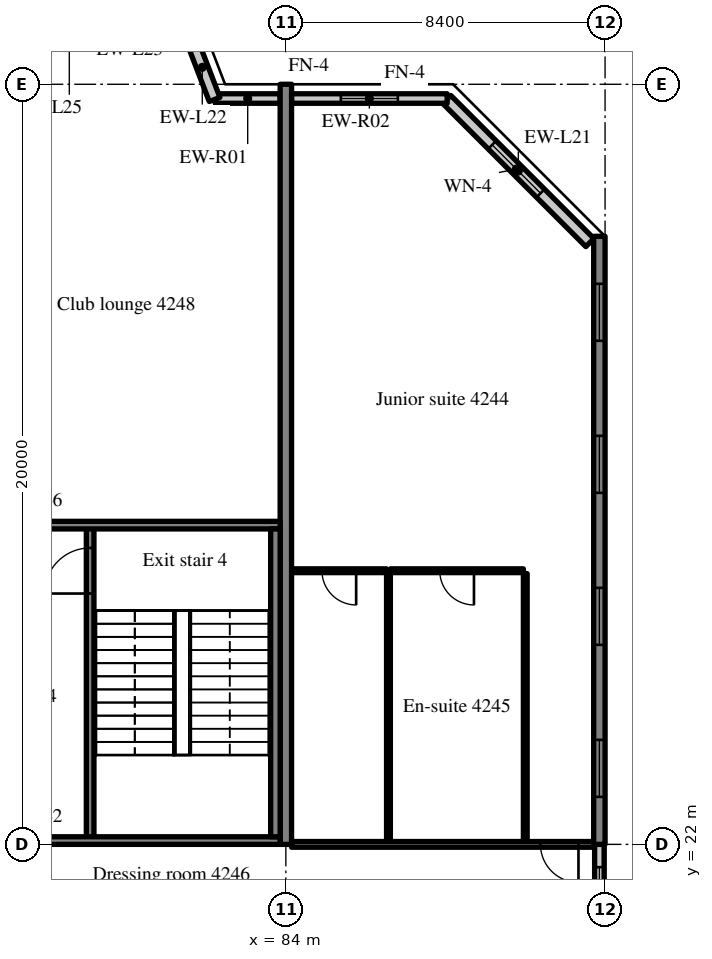
"""IFC4 building model, lengths in metres.
Left out: names, types, materials, properties, quantities, classifications, styles, units other than length and angle.
Written with IfcOpenShell. Run it as: python <this file> out.ifc"""

import sys

from ifc_helpers import new_model, si_unit, direction, frame, frame_2d, origin, place, context, subcontext, project, spatial, rectangle, extrude, source, transform, mapped, element, fill, save


model = new_model("IFC4")
c1 = context("Model", 3, precision=1e-05, world=origin(), true_north=direction((0.0, 1.0)))
c2 = subcontext(c1, "Body", "Model", "MODEL_VIEW")
j1 = project(units=[si_unit("LENGTHUNIT", "METRE"), si_unit("PLANEANGLEUNIT", "RADIAN")], contexts=[c1])
p1 = place(None, origin())
s1 = spatial("IfcSite", under=j1, at=p1, CompositionType="ELEMENT")
p2 = place(p1, origin())
s2 = spatial("IfcBuilding", under=s1, at=p2, CompositionType="ELEMENT")
p3 = place(p2, frame((0.0, 0.0, 174.4)))
s3 = spatial("IfcBuildingStorey", under=s2, at=p3, CompositionType="ELEMENT", Elevation=174.4)
m1 = source(origin(), c2, "Body", "SweptSolid", [
    extrude(rectangle(XDim=20.0, YDim=0.3, at=frame_2d((10.0, 0.0))), origin(), (0.0, 0.0, 1.0), 3.52),
])
p4 = place(p3, frame((84.0, 22.0, 0.0), z_axis=(0.0, 0.0, 1.0), x_axis=(0.0, 1.0, 0.0)))
e1 = element("IfcWall", 1, at=p4, inside=s3, PredefinedType="SHEAR", context=c2, shape_type="MappedRepresentation", body=[
    mapped(m1, transform((0.0, 0.0, 0.0), scale=1.0)),
])
m2 = source(origin(), c2, "Body", "SweptSolid", [
    extrude(rectangle(XDim=16.0, YDim=0.3, at=frame_2d((8.0, 0.0))), origin(), (0.0, 0.0, 1.0), 3.52),
])
p5 = place(p3, frame((92.25, 22.0, 0.0), z_axis=(0.0, 0.0, 1.0), x_axis=(0.0, 1.0, 0.0)))
e2 = element("IfcWall", 2, at=p5, inside=s3, PredefinedType="SHEAR", context=c2, shape_type="MappedRepresentation", body=[
    mapped(m2, transform((0.0, 0.0, 0.0), scale=1.0)),
])
m3 = source(origin(), c2, "Body", "SweptSolid", [
    extrude(rectangle(XDim=1.5, YDim=1.5, at=frame_2d((0.75, 0.75))), frame((0.0, 0.16, 0.0), z_axis=(0.0, -1.0, 0.0), x_axis=(1.0, 0.0, 0.0)), (0.0, 0.0, 1.0), 0.32),
])
p6 = place(p5, frame((1.25, 0.0, 0.9)))
e3 = element("IfcOpeningElement", 3, at=p6, cuts=e2, PredefinedType="OPENING", context=c2, shape_type="MappedRepresentation", body=[
    mapped(m3, transform((0.0, 0.0, 0.0), scale=1.0)),
])
p7 = place(p5, frame((5.25, 0.0, 0.9)))
e4 = element("IfcOpeningElement", 4, at=p7, cuts=e2, PredefinedType="OPENING", context=c2, shape_type="MappedRepresentation", body=[
    mapped(m3, transform((0.0, 0.0, 0.0), scale=1.0)),
])
p8 = place(p5, frame((9.25, 0.0, 0.9)))
e5 = element("IfcOpeningElement", 5, at=p8, cuts=e2, PredefinedType="OPENING", context=c2, shape_type="MappedRepresentation", body=[
    mapped(m3, transform((0.0, 0.0, 0.0), scale=1.0)),
])
p9 = place(p5, frame((13.25, 0.0, 0.9)))
e6 = element("IfcOpeningElement", 6, at=p9, cuts=e2, PredefinedType="OPENING", context=c2, shape_type="MappedRepresentation", body=[
    mapped(m3, transform((0.0, 0.0, 0.0), scale=1.0)),
])
m4 = source(origin(), c2, "Body", "SweptSolid", [
    extrude(rectangle(XDim=5.326, YDim=0.3, at=frame_2d((2.663, 0.0))), origin(), (0.0, 0.0, 1.0), 3.52),
])
p10 = place(p3, frame((92.0, 37.834, 0.0), z_axis=(0.0, 0.0, 1.0), x_axis=(-0.707083859269, 0.707129702361, 0.0)))
e7 = element("IfcWall", 7, at=p10, inside=s3, PredefinedType="SOLIDWALL", context=c2, shape_type="MappedRepresentation", body=[
    mapped(m4, transform((0.0, 0.0, 0.0), scale=1.0)),
])
m5 = source(origin(), c2, "Body", "SweptSolid", [
    extrude(rectangle(XDim=1.8, YDim=1.5, at=frame_2d((0.9, 0.75))), frame((0.0, 0.16, 0.0), z_axis=(0.0, -1.0, 0.0), x_axis=(1.0, 0.0, 0.0)), (0.0, 0.0, 1.0), 0.32),
])
p11 = place(p10, frame((1.836, 0.0, 0.9)))
e8 = element("IfcOpeningElement", 8, at=p11, cuts=e7, PredefinedType="OPENING", context=c2, shape_type="MappedRepresentation", body=[
    mapped(m5, transform((0.0, 0.0, 0.0), scale=1.0)),
])
m6 = source(origin(), c2, "Body", "SweptSolid", [
    extrude(rectangle(XDim=1.708, YDim=0.25, at=frame_2d((0.854, 0.0))), origin(), (0.0, 0.0, 1.0), 2.87),
])
p12 = place(p3, frame((83.85, 41.625, 0.0), z_axis=(0.0, 0.0, 1.0), x_axis=(-1.0, 0.0, 0.0)))
e9 = element("IfcWall", 9, at=p12, inside=s3, PredefinedType="SOLIDWALL", context=c2, shape_type="MappedRepresentation", body=[
    mapped(m6, transform((0.0, 0.0, 0.0), scale=1.0)),
])
m7 = source(origin(), c2, "Body", "SweptSolid", [
    extrude(rectangle(XDim=4.095, YDim=0.25, at=frame_2d((2.047, 0.0))), origin(), (0.0, 0.0, 1.0), 2.87),
])
p13 = place(p3, frame((88.245, 41.625, 0.0), z_axis=(0.0, 0.0, 1.0), x_axis=(-1.0, 0.0, 0.0)))
e10 = element("IfcWall", 10, at=p13, inside=s3, PredefinedType="SOLIDWALL", context=c2, shape_type="MappedRepresentation", body=[
    mapped(m7, transform((0.0, 0.0, 0.0), scale=1.0)),
])
m8 = source(origin(), c2, "Body", "SweptSolid", [
    extrude(rectangle(XDim=1.5, YDim=1.5, at=frame_2d((0.75, 0.75))), frame((0.0, 0.135, 0.0), z_axis=(0.0, -1.0, 0.0), x_axis=(1.0, 0.0, 0.0)), (0.0, 0.0, 1.0), 0.27),
])
p14 = place(p13, frame((1.297, 0.0, 0.9)))
e11 = element("IfcOpeningElement", 11, at=p14, cuts=e10, PredefinedType="OPENING", context=c2, shape_type="MappedRepresentation", body=[
    mapped(m8, transform((0.0, 0.0, 0.0), scale=1.0)),
])
m9 = source(origin(), c2, "Body", "SweptSolid", [
    extrude(rectangle(XDim=1.812, YDim=0.3, at=frame_2d((0.906, 0.0))), origin(), (0.0, 0.0, 1.0), 3.52),
])
p15 = place(p3, frame((82.125, 41.6, 0.0), z_axis=(0.0, 0.0, 1.0), x_axis=(-0.357877270961, 0.93376863244, 0.0)))
e12 = element("IfcWall", 12, at=p15, inside=s3, PredefinedType="SOLIDWALL", context=c2, shape_type="MappedRepresentation", body=[
    mapped(m9, transform((0.0, 0.0, 0.0), scale=1.0)),
])
m10 = source(origin(), c2, "Body", "SweptSolid", [
    extrude(rectangle(XDim=2.4, YDim=0.25, at=frame_2d((1.2, 0.0))), origin(), (0.0, 0.0, 1.0), 2.62),
])
p16 = place(p3, frame((92.25, 19.6, 0.0), z_axis=(0.0, 0.0, 1.0), x_axis=(0.0, 1.0, 0.0)))
e13 = element("IfcWall", 13, at=p16, inside=s3, PredefinedType="SOLIDWALL", context=c2, shape_type="MappedRepresentation", body=[
    mapped(m10, transform((0.0, 0.0, 0.0), scale=1.0)),
])
m11 = source(origin(), c2, "Body", "SweptSolid", [
    extrude(rectangle(XDim=1.2, YDim=1.5, at=frame_2d((0.6, 0.75))), frame((0.0, 0.135, 0.0), z_axis=(0.0, -1.0, 0.0), x_axis=(1.0, 0.0, 0.0)), (0.0, 0.0, 1.0), 0.27),
])
p17 = place(p16, frame((0.6, 0.0, 0.9)))
e14 = element("IfcOpeningElement", 14, at=p17, cuts=e13, PredefinedType="OPENING", context=c2, shape_type="MappedRepresentation", body=[
    mapped(m11, transform((0.0, 0.0, 0.0), scale=1.0)),
])
m12 = source(origin(), c2, "Body", "SweptSolid", [
    extrude(rectangle(XDim=8.3, YDim=0.2, at=frame_2d((4.15, 0.0))), origin(), (0.0, 0.0, 1.0), 3.52),
])
p18 = place(p3, frame((78.85, 22.1, 0.0), z_axis=(0.0, 0.0, 1.0), x_axis=(0.0, 1.0, 0.0)))
e15 = element("IfcWall", 15, at=p18, inside=s3, PredefinedType="SOLIDWALL", context=c2, shape_type="MappedRepresentation", body=[
    mapped(m12, transform((0.0, 0.0, 0.0), scale=1.0)),
])
m13 = source(origin(), c2, "Body", "SweptSolid", [
    extrude(rectangle(XDim=1.2, YDim=2.1, at=frame_2d((0.6, 1.05))), frame((0.0, 0.11, 0.0), z_axis=(0.0, -1.0, 0.0), x_axis=(1.0, 0.0, 0.0)), (0.0, 0.0, 1.0), 0.22),
])
p19 = place(p18, frame((6.5, 0.0, 0.0)))
e16 = element("IfcOpeningElement", 16, at=p19, cuts=e15, PredefinedType="OPENING", context=c2, shape_type="MappedRepresentation", body=[
    mapped(m13, transform((0.0, 0.0, 0.0), scale=1.0)),
])
m14 = source(origin(), c2, "Body", "SweptSolid", [
    extrude(rectangle(XDim=8.25, YDim=0.2, at=frame_2d((4.125, 0.0))), origin(), (0.0, 0.0, 1.0), 3.52),
])
p20 = place(p3, frame((83.85, 22.1, 0.0), z_axis=(0.0, 0.0, 1.0), x_axis=(-1.0, 0.0, 0.0)))
e17 = element("IfcWall", 17, at=p20, inside=s3, PredefinedType="SOLIDWALL", context=c2, shape_type="MappedRepresentation", body=[
    mapped(m14, transform((0.0, 0.0, 0.0), scale=1.0)),
])
p21 = place(p20, frame((6.05, 0.0, 0.0)))
e18 = element("IfcOpeningElement", 18, at=p21, cuts=e17, PredefinedType="OPENING", context=c2, shape_type="MappedRepresentation", body=[
    mapped(m13, transform((0.0, 0.0, 0.0), scale=1.0)),
])
p22 = place(p3, frame((83.85, 30.4, 0.0), z_axis=(0.0, 0.0, 1.0), x_axis=(-1.0, 0.0, 0.0)))
e19 = element("IfcWall", 19, at=p22, inside=s3, PredefinedType="SOLIDWALL", context=c2, shape_type="MappedRepresentation", body=[
    mapped(m14, transform((0.0, 0.0, 0.0), scale=1.0)),
])
m15 = source(origin(), c2, "Body", "SweptSolid", [
    extrude(rectangle(XDim=1.0, YDim=2.1, at=frame_2d((0.5, 1.05))), frame((0.0, 0.11, 0.0), z_axis=(0.0, -1.0, 0.0), x_axis=(1.0, 0.0, 0.0)), (0.0, 0.0, 1.0), 0.22),
])
p23 = place(p22, frame((6.15, 0.0, 0.0)))
e20 = element("IfcOpeningElement", 20, at=p23, cuts=e19, PredefinedType="OPENING", context=c2, shape_type="MappedRepresentation", body=[
    mapped(m15, transform((0.0, 0.0, 0.0), scale=1.0)),
])
m16 = source(origin(), c2, "Body", "SweptSolid", [
    extrude(rectangle(XDim=8.1, YDim=0.25, at=frame_2d((4.05, 0.0))), origin(), (0.0, 0.0, 1.0), 3.52),
])
p24 = place(p3, frame((83.725, 22.2, 0.0), z_axis=(0.0, 0.0, 1.0), x_axis=(0.0, 1.0, 0.0)))
e21 = element("IfcWall", 21, at=p24, inside=s3, PredefinedType="SOLIDWALL", context=c2, shape_type="MappedRepresentation", body=[
    mapped(m16, transform((0.0, 0.0, 0.0), scale=1.0)),
])
m17 = source(origin(), c2, "Body", "SweptSolid", [
    extrude(rectangle(XDim=7.05, YDim=0.1, at=frame_2d((3.525, 0.0))), origin(), (0.0, 0.0, 1.0), 3.52),
])
for number, where, z_axis, x_axis in (
    (22, (90.3, 22.075, 0.0), (0.0, 0.0, 1.0), (0.0, 1.0, 0.0)),
    (23, (86.7, 22.075, 0.0), (0.0, 0.0, 1.0), (0.0, 1.0, 0.0)),
):
    element("IfcWall", number, at=place(p3, frame(where, z_axis=z_axis, x_axis=x_axis)), inside=s3, PredefinedType="PARTITIONING", context=c2, shape_type="MappedRepresentation", body=[
        mapped(m17, transform((0.0, 0.0, 0.0), scale=1.0)),
    ])
m18 = source(origin(), c2, "Body", "SweptSolid", [
    extrude(rectangle(XDim=3.5, YDim=0.1, at=frame_2d((1.75, 0.0))), origin(), (0.0, 0.0, 1.0), 3.52),
])
p25 = place(p3, frame((86.75, 29.2, 0.0), z_axis=(0.0, 0.0, 1.0), x_axis=(1.0, 0.0, 0.0)))
e24 = element("IfcWall", 24, at=p25, inside=s3, PredefinedType="PARTITIONING", context=c2, shape_type="MappedRepresentation", body=[
    mapped(m18, transform((0.0, 0.0, 0.0), scale=1.0)),
])
m19 = source(origin(), c2, "Body", "SweptSolid", [
    extrude(rectangle(XDim=0.9, YDim=2.1, at=frame_2d((0.45, 1.05))), frame((0.0, 0.06, 0.0), z_axis=(0.0, -1.0, 0.0), x_axis=(1.0, 0.0, 0.0)), (0.0, 0.0, 1.0), 0.12),
])
p26 = place(p25, frame((1.3, 0.0, 0.0)))
e25 = element("IfcOpeningElement", 25, at=p26, cuts=e24, PredefinedType="OPENING", context=c2, shape_type="MappedRepresentation", body=[
    mapped(m19, transform((0.0, 0.0, 0.0), scale=1.0)),
])
m20 = source(origin(), c2, "Body", "SweptSolid", [
    extrude(rectangle(XDim=2.5, YDim=0.1, at=frame_2d((1.25, 0.0))), origin(), (0.0, 0.0, 1.0), 3.52),
])
p27 = place(p3, frame((84.15, 29.2, 0.0), z_axis=(0.0, 0.0, 1.0), x_axis=(1.0, 0.0, 0.0)))
e26 = element("IfcWall", 26, at=p27, inside=s3, PredefinedType="PARTITIONING", context=c2, shape_type="MappedRepresentation", body=[
    mapped(m20, transform((0.0, 0.0, 0.0), scale=1.0)),
])
p28 = place(p27, frame((0.8, 0.0, 0.0)))
e27 = element("IfcOpeningElement", 27, at=p28, cuts=e26, PredefinedType="OPENING", context=c2, shape_type="MappedRepresentation", body=[
    mapped(m19, transform((0.0, 0.0, 0.0), scale=1.0)),
])
m21 = source(origin(), c2, "Body", "SweptSolid", [
    extrude(rectangle(XDim=7.95, YDim=0.15, at=frame_2d((3.975, 0.0))), origin(), (0.0, 0.0, 1.0), 2.82),
])
p29 = place(p3, frame((84.15, 22.0, 0.0), z_axis=(0.0, 0.0, 1.0), x_axis=(1.0, 0.0, 0.0)))
e28 = element("IfcWall", 28, at=p29, inside=s3, PredefinedType="PARTITIONING", context=c2, shape_type="MappedRepresentation", body=[
    mapped(m21, transform((0.0, 0.0, 0.0), scale=1.0)),
])
m22 = source(origin(), c2, "Body", "SweptSolid", [
    extrude(rectangle(XDim=1.0, YDim=2.1, at=frame_2d((0.5, 1.05))), frame((0.0, 0.085, 0.0), z_axis=(0.0, -1.0, 0.0), x_axis=(1.0, 0.0, 0.0)), (0.0, 0.0, 1.0), 0.17),
])
p30 = place(p29, frame((6.55, 0.0, 0.0)))
e29 = element("IfcOpeningElement", 29, at=p30, cuts=e28, PredefinedType="OPENING", context=c2, shape_type="MappedRepresentation", body=[
    mapped(m22, transform((0.0, 0.0, 0.0), scale=1.0)),
])
m23 = source(origin(), c2, "Body", "SweptSolid", [
    extrude(rectangle(XDim=1.8, YDim=1.5, at=frame_2d((0.9, 0.75))), frame((0.0, 0.03, 0.0), z_axis=(0.0, -1.0, 0.0), x_axis=(1.0, 0.0, 0.0)), (0.0, 0.0, 1.0), 0.06),
])
p31 = place(p11, origin())
e30 = element("IfcWindow", 30, at=p31, inside=s3, PartitioningType="SINGLE_PANEL", PredefinedType="WINDOW", context=c2, shape_type="MappedRepresentation", body=[
    mapped(m23, transform((0.0, 0.0, 0.0), scale=1.0)),
])
fill(e8, e30)
m24 = source(origin(), c2, "Body", "SweptSolid", [
    extrude(rectangle(XDim=1.5, YDim=1.5, at=frame_2d((0.75, 0.75))), frame((0.0, 0.03, 0.0), z_axis=(0.0, -1.0, 0.0), x_axis=(1.0, 0.0, 0.0)), (0.0, 0.0, 1.0), 0.06),
])
p32 = place(p14, origin())
e31 = element("IfcWindow", 31, at=p32, inside=s3, PartitioningType="SINGLE_PANEL", PredefinedType="WINDOW", context=c2, shape_type="MappedRepresentation", body=[
    mapped(m24, transform((0.0, 0.0, 0.0), scale=1.0)),
])
fill(e11, e31)
p33 = place(p6, origin())
e32 = element("IfcWindow", 32, at=p33, inside=s3, PartitioningType="SINGLE_PANEL", PredefinedType="WINDOW", context=c2, shape_type="MappedRepresentation", body=[
    mapped(m24, transform((0.0, 0.0, 0.0), scale=1.0)),
])
fill(e3, e32)
p34 = place(p7, origin())
e33 = element("IfcWindow", 33, at=p34, inside=s3, PartitioningType="SINGLE_PANEL", PredefinedType="WINDOW", context=c2, shape_type="MappedRepresentation", body=[
    mapped(m24, transform((0.0, 0.0, 0.0), scale=1.0)),
])
fill(e4, e33)
p35 = place(p8, origin())
e34 = element("IfcWindow", 34, at=p35, inside=s3, PartitioningType="SINGLE_PANEL", PredefinedType="WINDOW", context=c2, shape_type="MappedRepresentation", body=[
    mapped(m24, transform((0.0, 0.0, 0.0), scale=1.0)),
])
fill(e5, e34)
p36 = place(p9, origin())
e35 = element("IfcWindow", 35, at=p36, inside=s3, PartitioningType="SINGLE_PANEL", PredefinedType="WINDOW", context=c2, shape_type="MappedRepresentation", body=[
    mapped(m24, transform((0.0, 0.0, 0.0), scale=1.0)),
])
fill(e6, e35)
m25 = source(origin(), c2, "Body", "SweptSolid", [
    extrude(rectangle(XDim=1.2, YDim=1.5, at=frame_2d((0.6, 0.75))), frame((0.0, 0.03, 0.0), z_axis=(0.0, -1.0, 0.0), x_axis=(1.0, 0.0, 0.0)), (0.0, 0.0, 1.0), 0.06),
])
p37 = place(p17, origin())
e36 = element("IfcWindow", 36, at=p37, inside=s3, PartitioningType="SINGLE_PANEL", PredefinedType="WINDOW", context=c2, shape_type="MappedRepresentation", body=[
    mapped(m25, transform((0.0, 0.0, 0.0), scale=1.0)),
])
fill(e14, e36)
m26 = source(origin(), c2, "Body", "SweptSolid", [
    extrude(rectangle(XDim=1.2, YDim=2.1, at=frame_2d((0.6, 1.05))), frame((0.0, 0.025, 0.0), z_axis=(0.0, -1.0, 0.0), x_axis=(1.0, 0.0, 0.0)), (0.0, 0.0, 1.0), 0.05),
])
p38 = place(p19, origin())
e37 = element("IfcDoor", 37, at=p38, inside=s3, OperationType="SINGLE_SWING_LEFT", PredefinedType="DOOR", context=c2, shape_type="MappedRepresentation", body=[
    mapped(m26, transform((0.0, 0.0, 0.0), scale=1.0)),
])
fill(e16, e37)
m27 = source(origin(), c2, "Body", "SweptSolid", [
    extrude(rectangle(XDim=0.9, YDim=2.1, at=frame_2d((0.45, 1.05))), frame((0.0, 0.025, 0.0), z_axis=(0.0, -1.0, 0.0), x_axis=(1.0, 0.0, 0.0)), (0.0, 0.0, 1.0), 0.05),
])
p39 = place(p26, origin())
e38 = element("IfcDoor", 38, at=p39, inside=s3, OperationType="SINGLE_SWING_RIGHT", PredefinedType="DOOR", context=c2, shape_type="MappedRepresentation", body=[
    mapped(m27, transform((0.0, 0.0, 0.0), scale=1.0)),
])
fill(e25, e38)
p40 = place(p28, origin())
e39 = element("IfcDoor", 39, at=p40, inside=s3, OperationType="SINGLE_SWING_RIGHT", PredefinedType="DOOR", context=c2, shape_type="MappedRepresentation", body=[
    mapped(m27, transform((0.0, 0.0, 0.0), scale=1.0)),
])
fill(e27, e39)
m28 = source(origin(), c2, "Body", "SweptSolid", [
    extrude(rectangle(XDim=1.0, YDim=2.1, at=frame_2d((0.5, 1.05))), frame((0.0, 0.025, 0.0), z_axis=(0.0, -1.0, 0.0), x_axis=(1.0, 0.0, 0.0)), (0.0, 0.0, 1.0), 0.05),
])
p41 = place(p30, origin())
e40 = element("IfcDoor", 40, at=p41, inside=s3, OperationType="SINGLE_SWING_RIGHT", PredefinedType="DOOR", context=c2, shape_type="MappedRepresentation", body=[
    mapped(m28, transform((0.0, 0.0, 0.0), scale=1.0)),
])
fill(e29, e40)
save(model, sys.argv[1])
